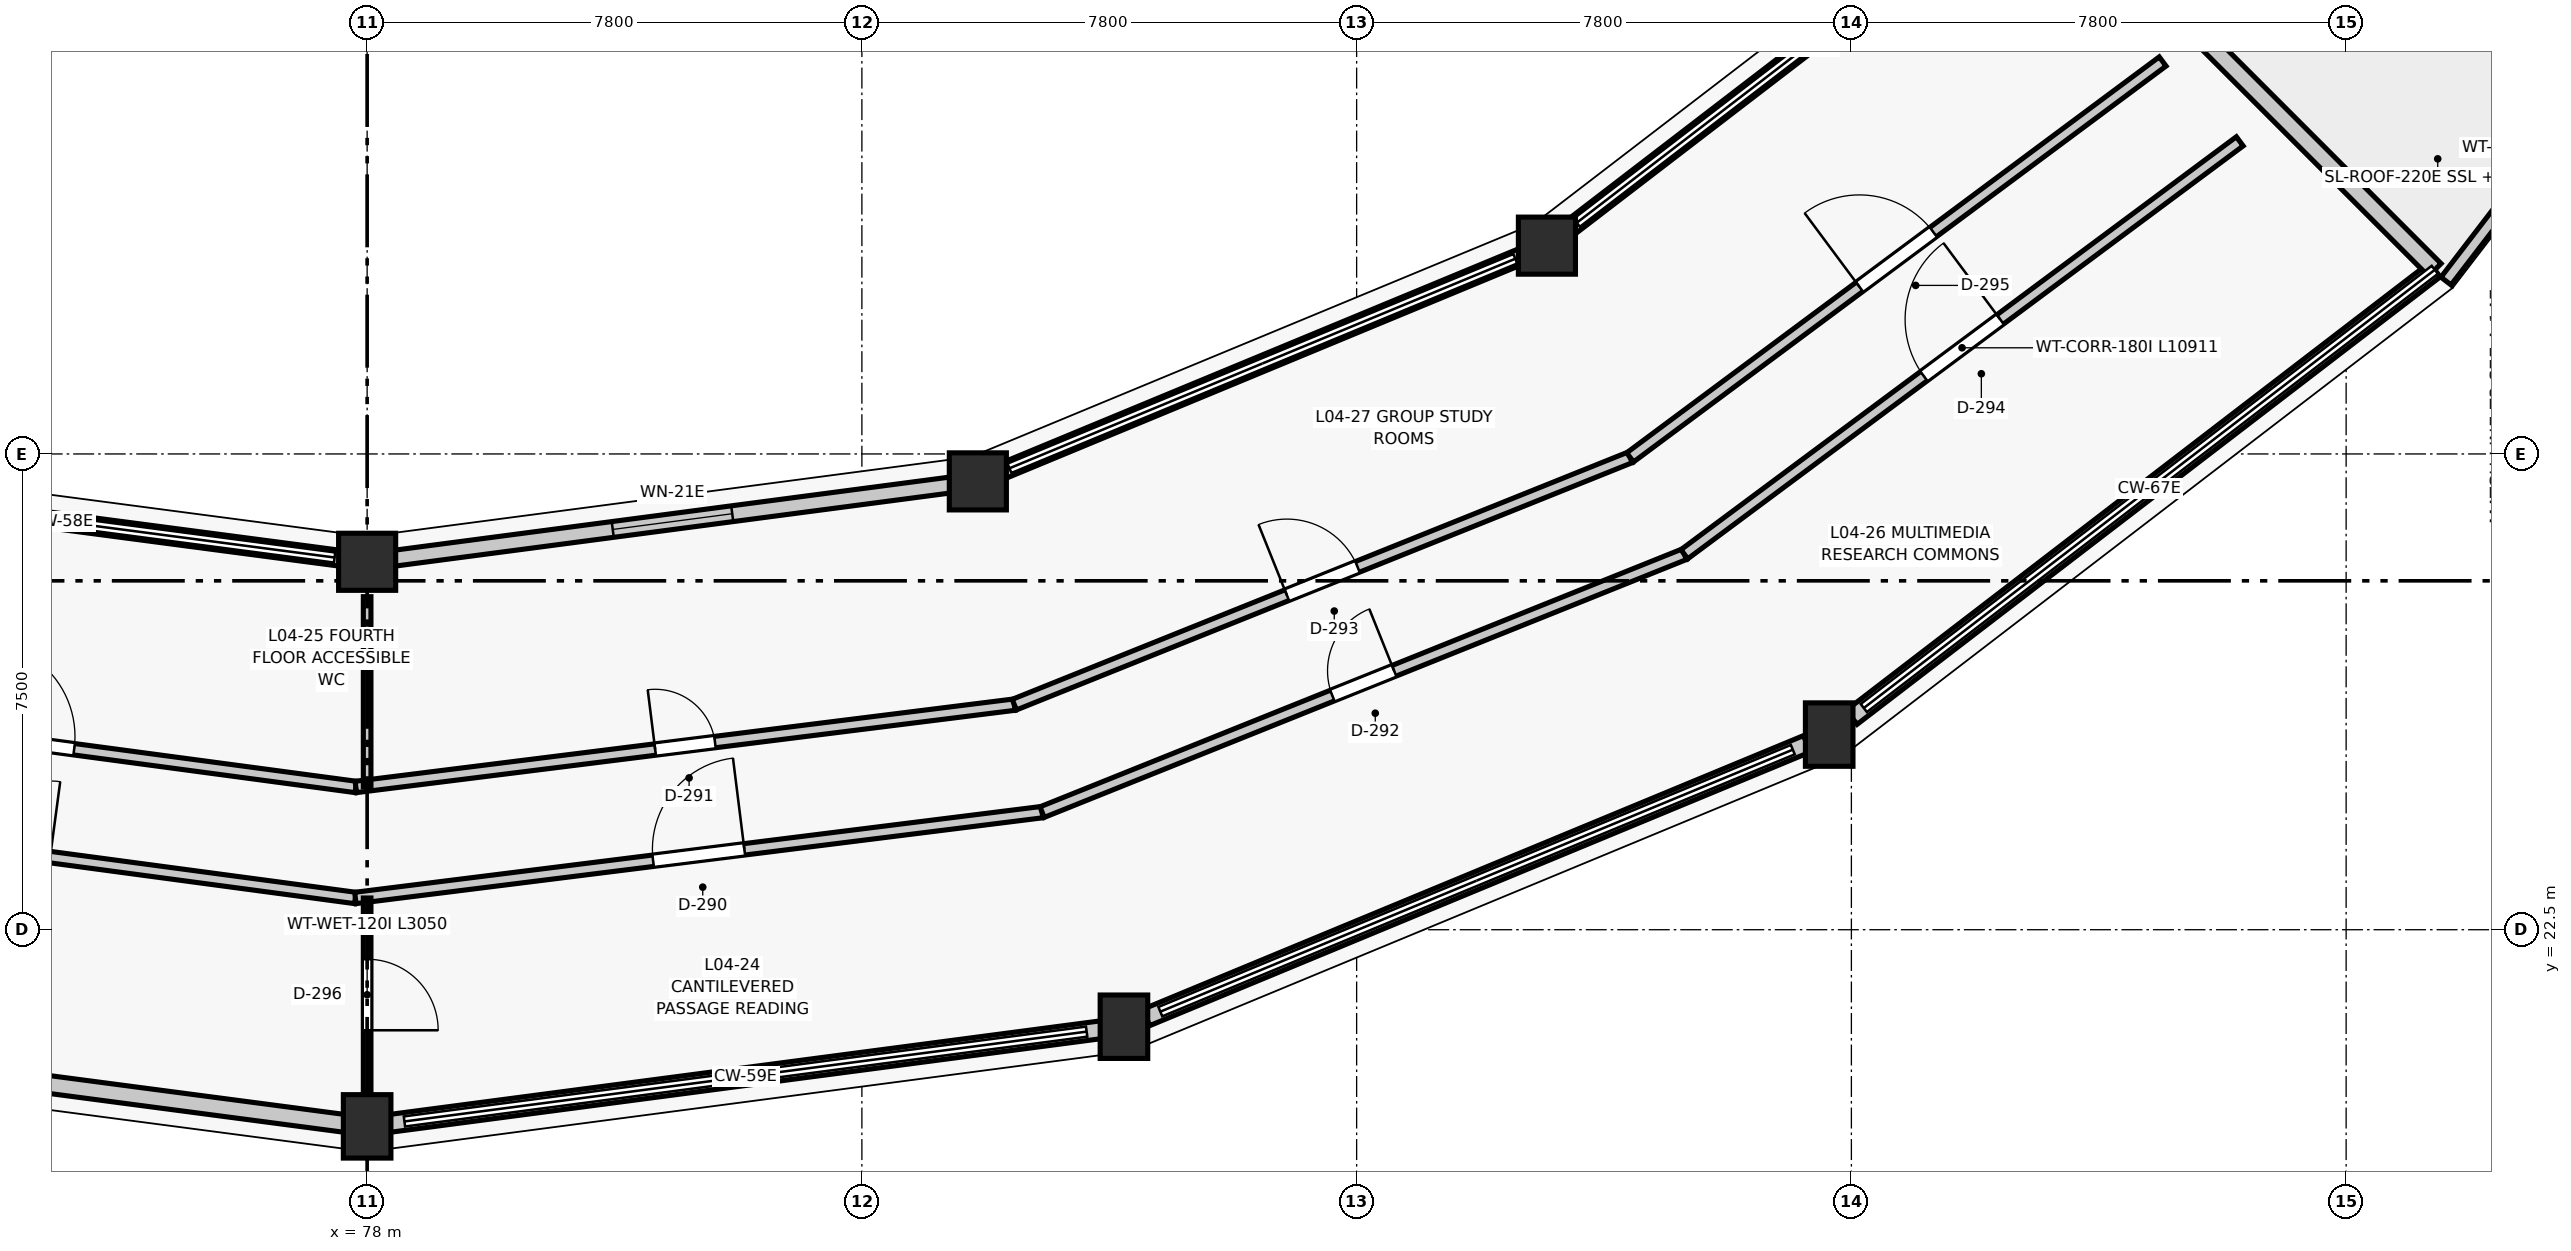
"""IFC4 building model, lengths in metres.
Left out: names, types, materials, properties, quantities, classifications, styles, units other than length and angle.
Written with IfcOpenShell. Run it as: python <this file> out.ifc"""

import sys

from ifc_helpers import new_model, si_unit, direction, frame, frame_2d, origin, origin_2d, place, context, subcontext, project, spatial, rectangle, circle, extrude, element, fill, save


model = new_model("IFC4")
c1 = context("Model", 3, precision=1e-05, world=origin(), true_north=direction((0.0, 1.0)))
c2 = subcontext(c1, "Body", "Model", "MODEL_VIEW")
j1 = project(units=[si_unit("LENGTHUNIT", "METRE"), si_unit("PLANEANGLEUNIT", "RADIAN")], contexts=[c1])
p1 = place(None, origin())
s1 = spatial("IfcSite", under=j1, at=p1, CompositionType="ELEMENT")
p2 = place(p1, origin())
s2 = spatial("IfcBuilding", under=s1, at=p2, CompositionType="ELEMENT")
p3 = place(p2, frame((0.0, 0.0, 16.5)))
s3 = spatial("IfcBuildingStorey", under=s2, at=p3, CompositionType="ELEMENT", Elevation=16.5)
p4 = place(p3, frame((87.628, 29.568, 0.0), z_axis=(0.0, 0.0, 1.0), x_axis=(1.0, 0.0, 0.0)))
e1 = element("IfcColumn", 1, at=p4, inside=s3, PredefinedType="COLUMN", context=c2, shape_type="SweptSolid", body=[
    extrude(circle(Radius=0.45, at=origin_2d()), origin(), (0.0, 0.0, 1.0), 3.9),
])
for number, where, z_axis, x_axis in (
    (2, (89.932, 20.971, 0.0), (0.0, 0.0, 1.0), (1.0, 0.0, 0.0)),
    (3, (78.0, 19.4, 0.0), (0.0, 0.0, 1.0), (1.0, 0.0, 0.0)),
):
    element("IfcColumn", number, at=place(p3, frame(where, z_axis=z_axis, x_axis=x_axis)), inside=s3, PredefinedType="COLUMN", context=c2, shape_type="SweptSolid", body=[
        extrude(rectangle(XDim=0.75, YDim=1.0, at=origin_2d()), origin(), (0.0, 0.0, 1.0), 3.9),
    ])
p5 = place(p3, frame((78.0, 28.3, 0.0), z_axis=(0.0, 0.0, 1.0), x_axis=(1.0, 0.0, 0.0)))
e4 = element("IfcColumn", 4, at=p5, inside=s3, PredefinedType="COLUMN", context=c2, shape_type="SweptSolid", body=[
    extrude(circle(Radius=0.45, at=origin_2d()), origin(), (0.0, 0.0, 1.0), 3.9),
])
p6 = place(p3, frame((101.05, 25.576, 0.0), z_axis=(0.0, 0.0, 1.0), x_axis=(1.0, 0.0, 0.0)))
e5 = element("IfcColumn", 5, at=p6, inside=s3, PredefinedType="COLUMN", context=c2, shape_type="SweptSolid", body=[
    extrude(rectangle(XDim=0.75, YDim=1.0, at=origin_2d()), origin(), (0.0, 0.0, 1.0), 3.9),
])
p7 = place(p3, frame((96.6, 33.284, 0.0), z_axis=(0.0, 0.0, 1.0), x_axis=(1.0, 0.0, 0.0)))
e6 = element("IfcColumn", 6, at=p7, inside=s3, PredefinedType="COLUMN", context=c2, shape_type="SweptSolid", body=[
    extrude(circle(Radius=0.45, at=origin_2d()), origin(), (0.0, 0.0, 1.0), 3.9),
])
p8 = place(p3, frame((77.65, 19.446, 0.0), z_axis=(0.0, 0.0, 1.0), x_axis=(-0.991443215359, 0.130538694334, 0.0)))
e7 = element("IfcWall", 7, at=p8, inside=s3, PredefinedType="STANDARD", context=c2, shape_type="SweptSolid", body=[
    extrude(rectangle(XDim=11.328, YDim=0.28, at=frame_2d((5.664, 0.0))), origin(), (0.0, 0.0, 1.0), 2.846),
])
p9 = place(p8, frame((4.814, 0.0, 0.85)))
e8 = element("IfcOpeningElement", 8, at=p9, cuts=e7, PredefinedType="OPENING", context=c2, shape_type="SweptSolid", body=[
    extrude(rectangle(XDim=1.7, YDim=1.75, at=frame_2d((0.85, 0.875))), frame((0.0, 0.15, 0.0), z_axis=(0.0, -1.0, 0.0), x_axis=(1.0, 0.0, 0.0)), (0.0, 0.0, 1.0), 0.3),
])
p10 = place(p3, frame((68.647, 29.531, 0.0), z_axis=(0.0, 0.0, 1.0), x_axis=(0.991441766434, -0.130549698469, 0.0)))
e9 = element("IfcWall", 9, at=p10, inside=s3, PredefinedType="STANDARD", context=c2, shape_type="SweptSolid", body=[
    extrude(rectangle(XDim=9.156, YDim=0.25, at=frame_2d((4.578, 0.0))), origin(), (0.0, 0.0, 1.0), 0.82),
])
p11 = place(p3, frame((89.581, 20.925, 0.0), z_axis=(0.0, 0.0, 1.0), x_axis=(-0.991443215359, -0.130538694334, 0.0)))
e10 = element("IfcWall", 10, at=p11, inside=s3, PredefinedType="STANDARD", context=c2, shape_type="SweptSolid", body=[
    extrude(rectangle(XDim=11.328, YDim=0.28, at=frame_2d((5.664, 0.0))), origin(), (0.0, 0.0, 1.0), 0.82),
])
p12 = place(p3, frame((78.275, 28.336, 0.0), z_axis=(0.0, 0.0, 1.0), x_axis=(0.991441766434, 0.130549698469, 0.0)))
e11 = element("IfcWall", 11, at=p12, inside=s3, PredefinedType="STANDARD", context=c2, shape_type="SweptSolid", body=[
    extrude(rectangle(XDim=9.156, YDim=0.25, at=frame_2d((4.578, 0.0))), origin(), (0.0, 0.0, 1.0), 2.929),
])
p13 = place(p12, frame((3.628, 0.0, 0.85)))
e12 = element("IfcOpeningElement", 12, at=p13, cuts=e11, PredefinedType="OPENING", context=c2, shape_type="SweptSolid", body=[
    extrude(rectangle(XDim=1.9, YDim=1.75, at=frame_2d((0.95, 0.875))), frame((0.0, 0.135, 0.0), z_axis=(0.0, -1.0, 0.0), x_axis=(1.0, 0.0, 0.0)), (0.0, 0.0, 1.0), 0.27),
])
p14 = place(p3, frame((100.698, 25.43, 0.0), z_axis=(0.0, 0.0, 1.0), x_axis=(-0.923883530636, -0.382673779896, 0.0)))
e13 = element("IfcWall", 13, at=p14, inside=s3, PredefinedType="STANDARD", context=c2, shape_type="SweptSolid", body=[
    extrude(rectangle(XDim=11.272, YDim=0.28, at=frame_2d((5.636, 0.0))), origin(), (0.0, 0.0, 1.0), 0.82),
])
p15 = place(p3, frame((87.905, 29.682, 0.0), z_axis=(0.0, 0.0, 1.0), x_axis=(0.923880324771, 0.382681519675, 0.0)))
e14 = element("IfcWall", 14, at=p15, inside=s3, PredefinedType="STANDARD", context=c2, shape_type="SweptSolid", body=[
    extrude(rectangle(XDim=9.112, YDim=0.25, at=frame_2d((4.556, 0.0))), origin(), (0.0, 0.0, 1.0), 0.82),
])
p16 = place(p3, frame((110.598, 32.902, 0.0), z_axis=(0.0, 0.0, 1.0), x_axis=(-0.793347191248, -0.608769442514, 0.0)))
e15 = element("IfcWall", 15, at=p16, inside=s3, PredefinedType="STANDARD", context=c2, shape_type="SweptSolid", body=[
    extrude(rectangle(XDim=11.587, YDim=0.28, at=frame_2d((5.793, 0.0))), origin(), (0.0, 0.0, 1.0), 0.82),
])
p17 = place(p3, frame((96.88, 33.499, 0.0), z_axis=(0.0, 0.0, 1.0), x_axis=(0.793358552894, 0.608754635752, 0.0)))
e16 = element("IfcWall", 16, at=p17, inside=s3, PredefinedType="STANDARD", context=c2, shape_type="SweptSolid", body=[
    extrude(rectangle(XDim=9.358, YDim=0.25, at=frame_2d((4.679, 0.0))), origin(), (0.0, 0.0, 1.0), 0.82),
])
p18 = place(p3, frame((104.304, 39.196, 0.0), z_axis=(0.0, 0.0, 1.0), x_axis=(0.707106781187, -0.707106781187, 0.0)))
e17 = element("IfcWall", 17, at=p18, inside=s3, PredefinedType="STANDARD", context=c2, shape_type="SweptSolid", body=[
    extrude(rectangle(XDim=8.9, YDim=0.28, at=frame_2d((4.45, 0.0))), origin(), (0.0, 0.0, 1.0), 3.63),
])
p19 = place(p3, frame((110.774, 32.726, 0.0), z_axis=(0.0, 0.0, 1.0), x_axis=(0.608767399899, 0.79334875863, 0.0)))
e18 = element("IfcWall", 18, at=p19, inside=s3, PredefinedType="PARAPET", context=c2, shape_type="SweptSolid", body=[
    extrude(rectangle(XDim=12.1, YDim=0.2, at=frame_2d((6.05, 0.0))), origin(), (0.0, 0.0, 1.0), 1.12),
])
p20 = place(p3, frame((67.0, 24.448, 0.0), z_axis=(0.0, 0.0, 1.0), x_axis=(0.991157800834, -0.132688408862, 0.0)))
e19 = element("IfcWall", 19, at=p20, inside=s3, PredefinedType="PARTITIONING", context=c2, shape_type="SweptSolid", body=[
    extrude(rectangle(XDim=10.911, YDim=0.18, at=frame_2d((5.456, 0.0))), origin(), (0.0, 0.0, 1.0), 3.635),
])
p21 = place(p20, frame((4.855, 0.0, 0.0)))
e20 = element("IfcOpeningElement", 20, at=p21, cuts=e19, PredefinedType="OPENING", context=c2, shape_type="SweptSolid", body=[
    extrude(rectangle(XDim=1.2, YDim=2.15, at=frame_2d((0.6, 1.075))), frame((0.0, 0.1, 0.0), z_axis=(0.0, -1.0, 0.0), x_axis=(1.0, 0.0, 0.0)), (0.0, 0.0, 1.0), 0.2),
])
p22 = place(p3, frame((67.453, 26.138, 0.0), z_axis=(0.0, 0.0, 1.0), x_axis=(0.99116030885, -0.132669673098, 0.0)))
e21 = element("IfcWall", 21, at=p22, inside=s3, PredefinedType="PARTITIONING", context=c2, shape_type="SweptSolid", body=[
    extrude(rectangle(XDim=10.462, YDim=0.18, at=frame_2d((5.231, 0.0))), origin(), (0.0, 0.0, 1.0), 3.635),
])
p23 = place(p22, frame((4.481, 0.0, 0.0)))
e22 = element("IfcOpeningElement", 22, at=p23, cuts=e21, PredefinedType="OPENING", context=c2, shape_type="SweptSolid", body=[
    extrude(rectangle(XDim=1.5, YDim=2.15, at=frame_2d((0.75, 1.075))), frame((0.0, 0.1, 0.0), z_axis=(0.0, -1.0, 0.0), x_axis=(1.0, 0.0, 0.0)), (0.0, 0.0, 1.0), 0.2),
])
p24 = place(p3, frame((77.815, 23.0, 0.0), z_axis=(0.0, 0.0, 1.0), x_axis=(0.992278220961, 0.124031980579, 0.0)))
e23 = element("IfcWall", 23, at=p24, inside=s3, PredefinedType="PARTITIONING", context=c2, shape_type="SweptSolid", body=[
    extrude(rectangle(XDim=10.911, YDim=0.18, at=frame_2d((5.455, 0.0))), origin(), (0.0, 0.0, 1.0), 3.635),
])
p25 = place(p24, frame((4.73, 0.0, 0.0)))
e24 = element("IfcOpeningElement", 24, at=p25, cuts=e23, PredefinedType="OPENING", context=c2, shape_type="SweptSolid", body=[
    extrude(rectangle(XDim=1.45, YDim=2.2, at=frame_2d((0.725, 1.1))), frame((0.0, 0.1, 0.0), z_axis=(0.0, -1.0, 0.0), x_axis=(1.0, 0.0, 0.0)), (0.0, 0.0, 1.0), 0.2),
])
p26 = place(p3, frame((77.822, 24.75, 0.0), z_axis=(0.0, 0.0, 1.0), x_axis=(0.992277517675, 0.124037606868, 0.0)))
e25 = element("IfcWall", 25, at=p26, inside=s3, PredefinedType="PARTITIONING", context=c2, shape_type="SweptSolid", body=[
    extrude(rectangle(XDim=10.461, YDim=0.18, at=frame_2d((5.231, 0.0))), origin(), (0.0, 0.0, 1.0), 3.635),
])
p27 = place(p26, frame((4.756, 0.0, 0.0)))
e26 = element("IfcOpeningElement", 26, at=p27, cuts=e25, PredefinedType="OPENING", context=c2, shape_type="SweptSolid", body=[
    extrude(rectangle(XDim=0.95, YDim=2.1, at=frame_2d((0.475, 1.05))), frame((0.0, 0.1, 0.0), z_axis=(0.0, -1.0, 0.0), x_axis=(1.0, 0.0, 0.0)), (0.0, 0.0, 1.0), 0.2),
])
p28 = place(p3, frame((88.641, 24.354, 0.0), z_axis=(0.0, 0.0, 1.0), x_axis=(0.927999085714, 0.37258246995, 0.0)))
e27 = element("IfcWall", 27, at=p28, inside=s3, PredefinedType="PARTITIONING", context=c2, shape_type="SweptSolid", body=[
    extrude(rectangle(XDim=10.911, YDim=0.18, at=frame_2d((5.456, 0.0))), origin(), (0.0, 0.0, 1.0), 3.635),
])
p29 = place(p28, frame((4.93, 0.0, 0.0)))
e28 = element("IfcOpeningElement", 28, at=p29, cuts=e27, PredefinedType="OPENING", context=c2, shape_type="SweptSolid", body=[
    extrude(rectangle(XDim=1.05, YDim=2.1, at=frame_2d((0.525, 1.05))), frame((0.0, 0.1, 0.0), z_axis=(0.0, -1.0, 0.0), x_axis=(1.0, 0.0, 0.0)), (0.0, 0.0, 1.0), 0.2),
])
p30 = place(p3, frame((88.203, 26.048, 0.0), z_axis=(0.0, 0.0, 1.0), x_axis=(0.928004381605, 0.372569279091, 0.0)))
e29 = element("IfcWall", 29, at=p30, inside=s3, PredefinedType="PARTITIONING", context=c2, shape_type="SweptSolid", body=[
    extrude(rectangle(XDim=10.462, YDim=0.18, at=frame_2d((5.231, 0.0))), origin(), (0.0, 0.0, 1.0), 3.635),
])
p31 = place(p30, frame((4.631, 0.0, 0.0)))
e30 = element("IfcOpeningElement", 30, at=p31, cuts=e29, PredefinedType="OPENING", context=c2, shape_type="SweptSolid", body=[
    extrude(rectangle(XDim=1.2, YDim=2.15, at=frame_2d((0.6, 1.075))), frame((0.0, 0.1, 0.0), z_axis=(0.0, -1.0, 0.0), x_axis=(1.0, 0.0, 0.0)), (0.0, 0.0, 1.0), 0.2),
])
p32 = place(p3, frame((98.766, 28.419, 0.0), z_axis=(0.0, 0.0, 1.0), x_axis=(0.802562330416, 0.596568274213, 0.0)))
e31 = element("IfcWall", 31, at=p32, inside=s3, PredefinedType="PARTITIONING", context=c2, shape_type="SweptSolid", body=[
    extrude(rectangle(XDim=10.911, YDim=0.18, at=frame_2d((5.456, 0.0))), origin(), (0.0, 0.0, 1.0), 3.635),
])
p33 = place(p32, frame((4.705, 0.0, 0.0)))
e32 = element("IfcOpeningElement", 32, at=p33, cuts=e31, PredefinedType="OPENING", context=c2, shape_type="SweptSolid", body=[
    extrude(rectangle(XDim=1.5, YDim=2.15, at=frame_2d((0.75, 1.075))), frame((0.0, 0.1, 0.0), z_axis=(0.0, -1.0, 0.0), x_axis=(1.0, 0.0, 0.0)), (0.0, 0.0, 1.0), 0.2),
])
p34 = place(p3, frame((97.911, 29.946, 0.0), z_axis=(0.0, 0.0, 1.0), x_axis=(0.802552300002, 0.596581767876, 0.0)))
e33 = element("IfcWall", 33, at=p34, inside=s3, PredefinedType="PARTITIONING", context=c2, shape_type="SweptSolid", body=[
    extrude(rectangle(XDim=10.462, YDim=0.18, at=frame_2d((5.231, 0.0))), origin(), (0.0, 0.0, 1.0), 3.635),
])
p35 = place(p34, frame((4.506, 0.0, 0.0)))
e34 = element("IfcOpeningElement", 34, at=p35, cuts=e33, PredefinedType="OPENING", context=c2, shape_type="SweptSolid", body=[
    extrude(rectangle(XDim=1.45, YDim=2.2, at=frame_2d((0.725, 1.1))), frame((0.0, 0.1, 0.0), z_axis=(0.0, -1.0, 0.0), x_axis=(1.0, 0.0, 0.0)), (0.0, 0.0, 1.0), 0.2),
])
p36 = place(p3, frame((78.0, 23.0, 0.0), z_axis=(0.0, 0.0, 1.0), x_axis=(0.0, -1.0, 0.0)))
e35 = element("IfcWall", 35, at=p36, inside=s3, PredefinedType="PARTITIONING", context=c2, shape_type="SweptSolid", body=[
    extrude(rectangle(XDim=3.05, YDim=0.12, at=frame_2d((1.525, 0.0))), origin(), (0.0, 0.0, 1.0), 2.997),
])
p37 = place(p36, frame((0.965, 0.0, 0.0)))
e36 = element("IfcOpeningElement", 36, at=p37, cuts=e35, PredefinedType="OPENING", context=c2, shape_type="SweptSolid", body=[
    extrude(rectangle(XDim=1.12, YDim=2.1, at=frame_2d((0.56, 1.05))), frame((0.0, 0.07, 0.0), z_axis=(0.0, -1.0, 0.0), x_axis=(1.0, 0.0, 0.0)), (0.0, 0.0, 1.0), 0.14),
])
p38 = place(p3, frame((78.0, 27.75, 0.0), z_axis=(0.0, 0.0, 1.0), x_axis=(0.0, -1.0, 0.0)))
e37 = element("IfcWall", 37, at=p38, inside=s3, PredefinedType="PARTITIONING", context=c2, shape_type="SweptSolid", body=[
    extrude(rectangle(XDim=3.0, YDim=0.12, at=frame_2d((1.5, 0.0))), origin(), (0.0, 0.0, 1.0), 2.997),
])
p39 = place(p13, origin())
e38 = element("IfcWindow", 38, at=p39, inside=s3, PartitioningType="SINGLE_PANEL", PredefinedType="WINDOW", context=c2, shape_type="SweptSolid", body=[
    extrude(rectangle(XDim=1.9, YDim=1.75, at=frame_2d((0.95, 0.875))), frame((0.0, 0.03, 0.0), z_axis=(0.0, -1.0, 0.0), x_axis=(1.0, 0.0, 0.0)), (0.0, 0.0, 1.0), 0.06),
])
fill(e12, e38)
p40 = place(p23, origin())
e39 = element("IfcDoor", 39, at=p40, inside=s3, OperationType="SINGLE_SWING_LEFT", PredefinedType="DOOR", context=c2, shape_type="SweptSolid", body=[
    extrude(rectangle(XDim=1.5, YDim=2.15, at=frame_2d((0.75, 1.075))), frame((0.0, 0.025, 0.0), z_axis=(0.0, -1.0, 0.0), x_axis=(1.0, 0.0, 0.0)), (0.0, 0.0, 1.0), 0.05),
])
fill(e22, e39)
p41 = place(p25, origin())
e40 = element("IfcDoor", 40, at=p41, inside=s3, OperationType="SINGLE_SWING_RIGHT", PredefinedType="DOOR", context=c2, shape_type="SweptSolid", body=[
    extrude(rectangle(XDim=1.45, YDim=2.2, at=frame_2d((0.725, 1.1))), frame((0.0, 0.025, 0.0), z_axis=(0.0, -1.0, 0.0), x_axis=(1.0, 0.0, 0.0)), (0.0, 0.0, 1.0), 0.05),
])
fill(e24, e40)
p42 = place(p27, origin())
e41 = element("IfcDoor", 41, at=p42, inside=s3, OperationType="SINGLE_SWING_LEFT", PredefinedType="DOOR", context=c2, shape_type="SweptSolid", body=[
    extrude(rectangle(XDim=0.95, YDim=2.1, at=frame_2d((0.475, 1.05))), frame((0.0, 0.025, 0.0), z_axis=(0.0, -1.0, 0.0), x_axis=(1.0, 0.0, 0.0)), (0.0, 0.0, 1.0), 0.05),
])
fill(e26, e41)
p43 = place(p29, origin())
e42 = element("IfcDoor", 42, at=p43, inside=s3, OperationType="SINGLE_SWING_RIGHT", PredefinedType="DOOR", context=c2, shape_type="SweptSolid", body=[
    extrude(rectangle(XDim=1.05, YDim=2.1, at=frame_2d((0.525, 1.05))), frame((0.0, 0.025, 0.0), z_axis=(0.0, -1.0, 0.0), x_axis=(1.0, 0.0, 0.0)), (0.0, 0.0, 1.0), 0.05),
])
fill(e28, e42)
p44 = place(p31, origin())
e43 = element("IfcDoor", 43, at=p44, inside=s3, OperationType="SINGLE_SWING_LEFT", PredefinedType="DOOR", context=c2, shape_type="SweptSolid", body=[
    extrude(rectangle(XDim=1.2, YDim=2.15, at=frame_2d((0.6, 1.075))), frame((0.0, 0.025, 0.0), z_axis=(0.0, -1.0, 0.0), x_axis=(1.0, 0.0, 0.0)), (0.0, 0.0, 1.0), 0.05),
])
fill(e30, e43)
p45 = place(p33, origin())
e44 = element("IfcDoor", 44, at=p45, inside=s3, OperationType="SINGLE_SWING_RIGHT", PredefinedType="DOOR", context=c2, shape_type="SweptSolid", body=[
    extrude(rectangle(XDim=1.5, YDim=2.15, at=frame_2d((0.75, 1.075))), frame((0.0, 0.025, 0.0), z_axis=(0.0, -1.0, 0.0), x_axis=(1.0, 0.0, 0.0)), (0.0, 0.0, 1.0), 0.05),
])
fill(e32, e44)
p46 = place(p35, origin())
e45 = element("IfcDoor", 45, at=p46, inside=s3, OperationType="SINGLE_SWING_LEFT", PredefinedType="DOOR", context=c2, shape_type="SweptSolid", body=[
    extrude(rectangle(XDim=1.45, YDim=2.2, at=frame_2d((0.725, 1.1))), frame((0.0, 0.025, 0.0), z_axis=(0.0, -1.0, 0.0), x_axis=(1.0, 0.0, 0.0)), (0.0, 0.0, 1.0), 0.05),
])
fill(e34, e45)
p47 = place(p37, origin())
e46 = element("IfcDoor", 46, at=p47, inside=s3, OperationType="SINGLE_SWING_RIGHT", PredefinedType="DOOR", context=c2, shape_type="SweptSolid", body=[
    extrude(rectangle(XDim=1.12, YDim=2.1, at=frame_2d((0.56, 1.05))), frame((0.0, 0.025, 0.0), z_axis=(0.0, -1.0, 0.0), x_axis=(1.0, 0.0, 0.0)), (0.0, 0.0, 1.0), 0.05),
])
fill(e36, e46)
save(model, sys.argv[1])
